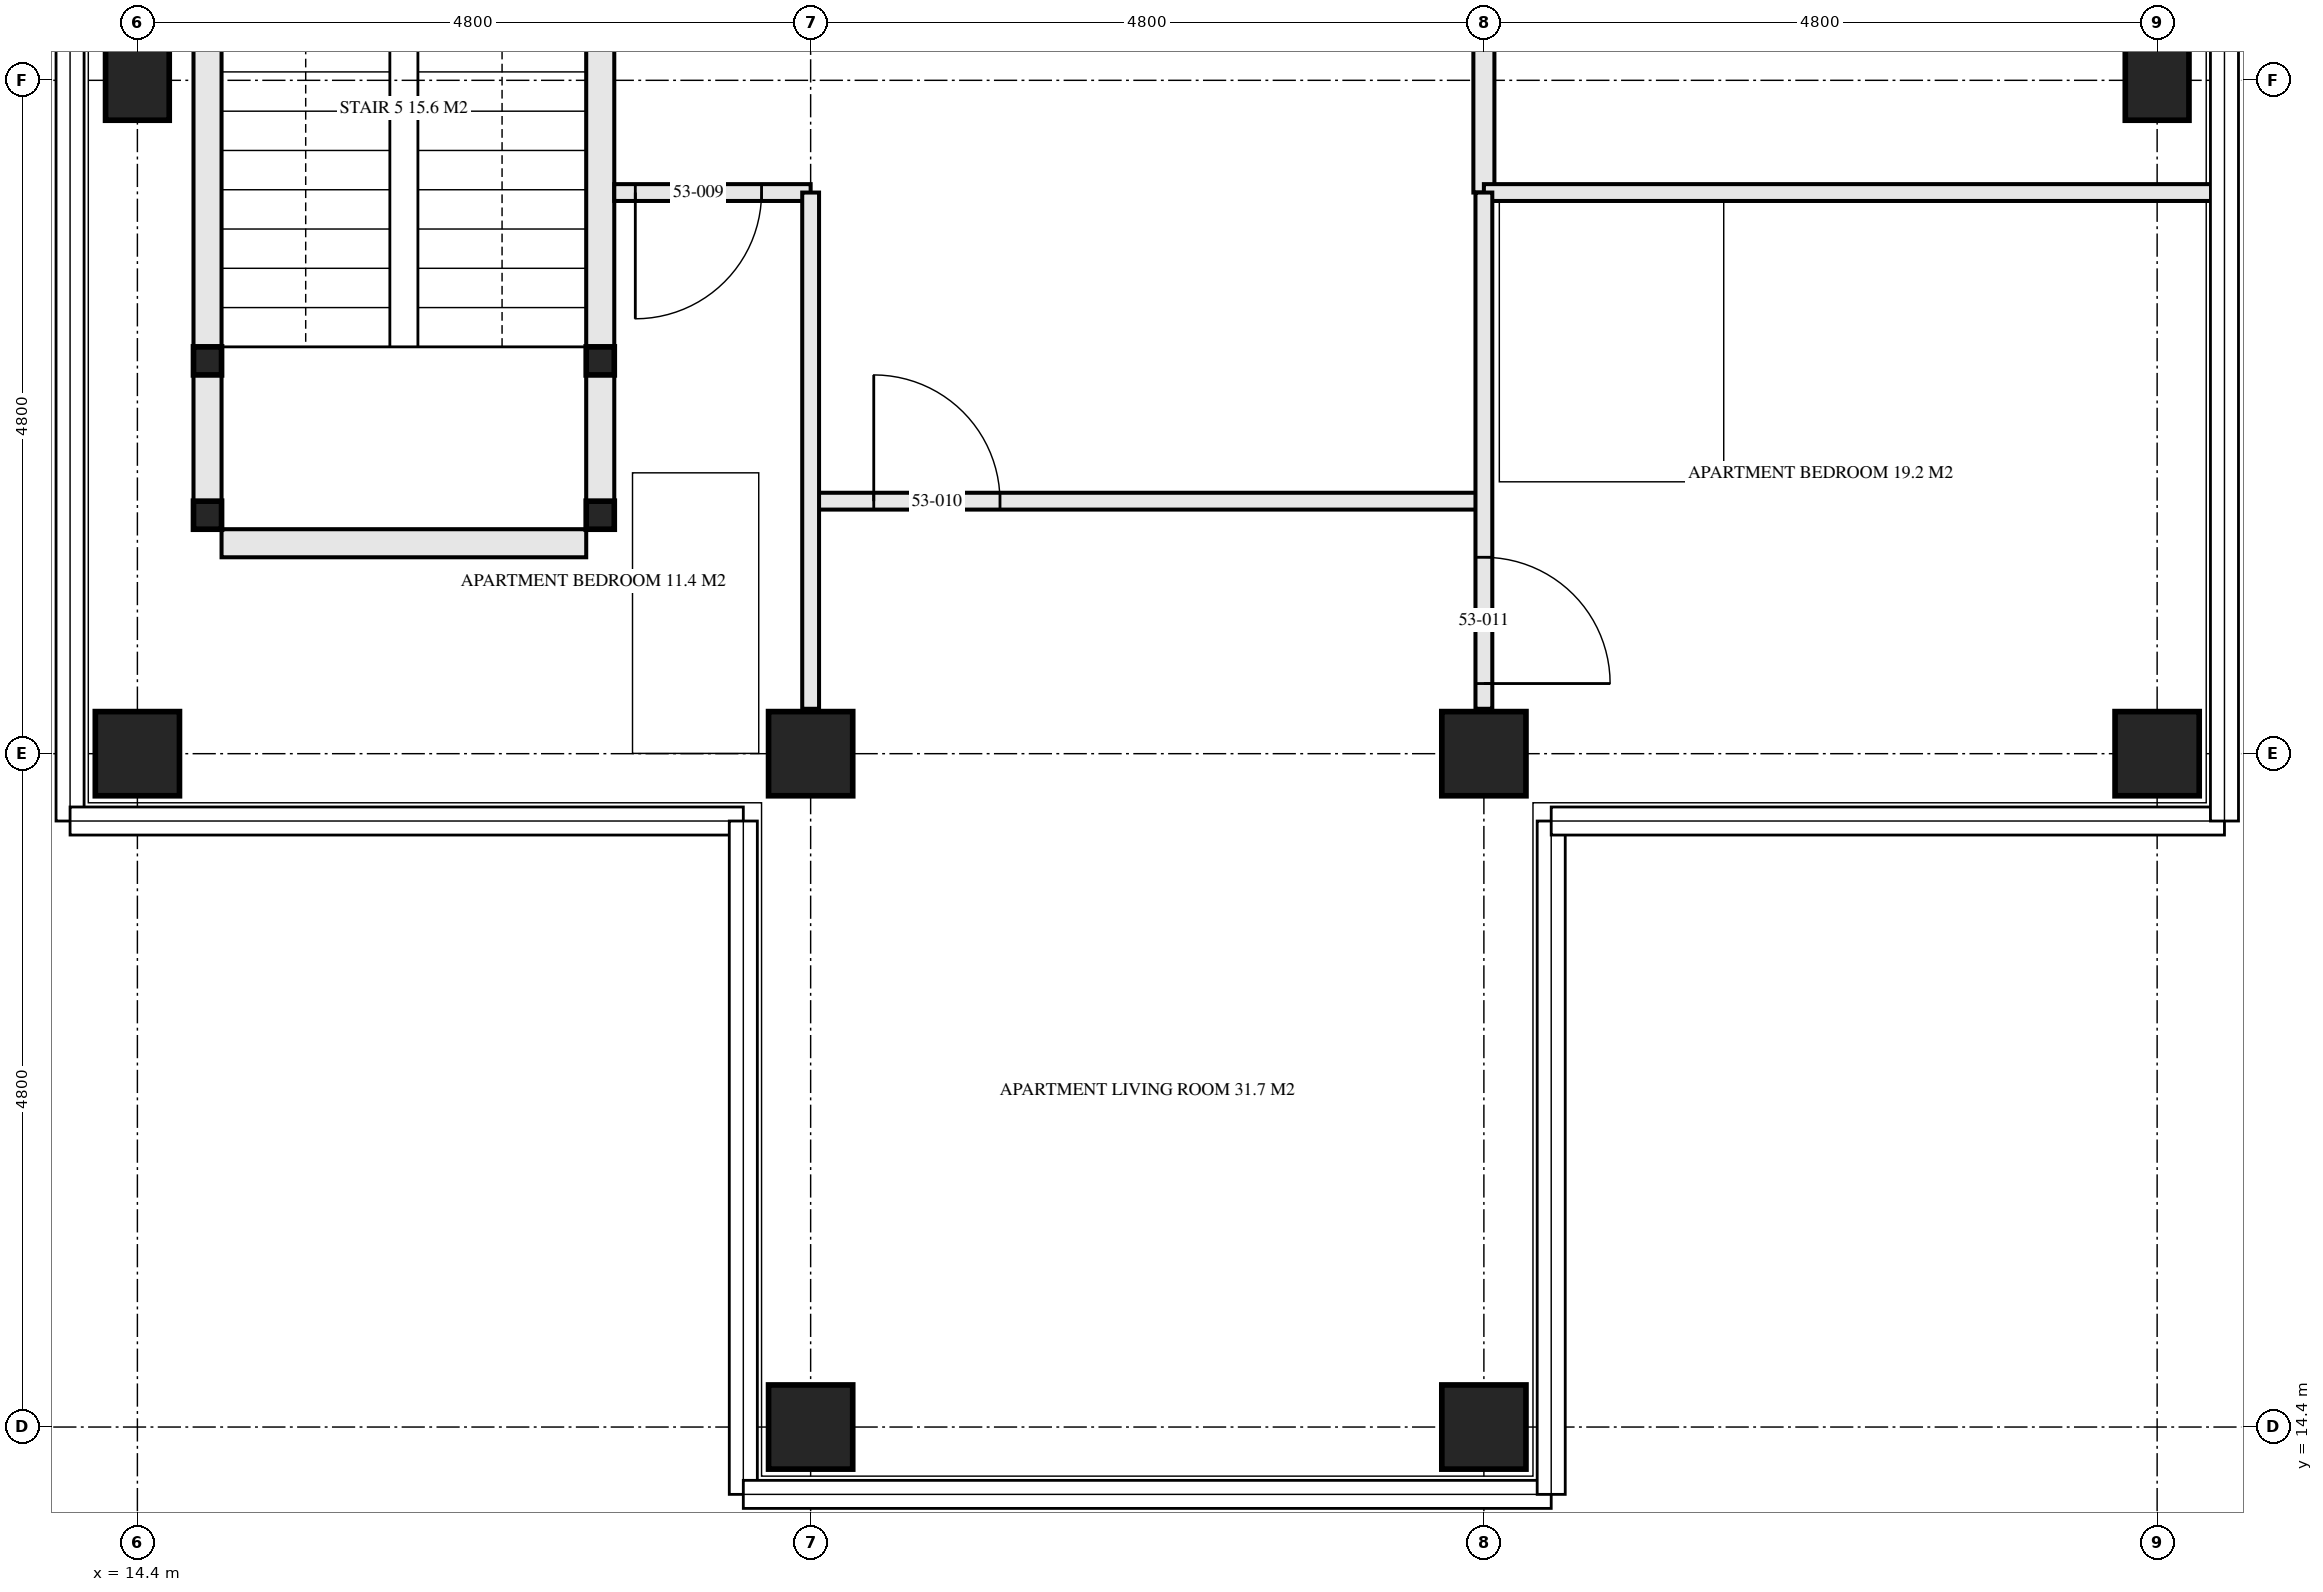
"""IFC4 building model, lengths in metres.
Left out: names, types, materials, properties, quantities, classifications, styles, units other than length and angle.
Written with IfcOpenShell. Run it as: python <this file> out.ifc"""

import sys

from ifc_helpers import new_model, si_unit, direction, frame, frame_2d, origin, origin_2d, place, context, subcontext, project, spatial, rectangle, hollow_rectangle, i_section, extrude, element, fill, save


model = new_model("IFC4")
c1 = context("Model", 3, precision=1e-05, world=origin(), true_north=direction((0.0, 1.0)))
c2 = subcontext(c1, "Body", "Model", "MODEL_VIEW")
j1 = project(units=[si_unit("LENGTHUNIT", "METRE"), si_unit("PLANEANGLEUNIT", "RADIAN")], contexts=[c1])
p1 = place(None, origin())
s1 = spatial("IfcSite", under=j1, at=p1, CompositionType="ELEMENT")
p2 = place(p1, origin())
s2 = spatial("IfcBuilding", under=s1, at=p2, CompositionType="ELEMENT")
p3 = place(p2, frame((0.0, 0.0, 194.5)))
s3 = spatial("IfcBuildingStorey", under=s2, at=p3, CompositionType="ELEMENT", Elevation=194.5)
p4 = place(p3, frame((14.4, 19.2, 0.0), z_axis=(0.0, 0.0, 1.0), x_axis=(0.0, 1.0, 0.0)))
e1 = element("IfcColumn", 1, at=p4, inside=s3, PredefinedType="COLUMN", context=c2, shape_type="SweptSolid", body=[
    extrude(hollow_rectangle(XDim=0.6, YDim=0.6, WallThickness=0.05, at=origin_2d()), origin(), (0.0, 0.0, 1.0), 3.5),
])
p5 = place(p3, frame((14.4, 24.0, 0.0), z_axis=(0.0, 0.0, 1.0), x_axis=(1.0, 0.0, 0.0)))
e2 = element("IfcColumn", 2, at=p5, inside=s3, PredefinedType="COLUMN", context=c2, shape_type="SweptSolid", body=[
    extrude(i_section(OverallWidth=0.454, OverallDepth=0.569, WebThickness=0.078, FlangeThickness=0.125, FilletRadius=0.015, at=origin_2d()), origin(), (0.0, 0.0, 1.0), 3.5),
])
for number, where, z_axis, x_axis in (
    (3, (19.2, 14.4, 0.0), (0.0, 0.0, 1.0), (0.0, 1.0, 0.0)),
    (4, (19.2, 19.2, 0.0), (0.0, 0.0, 1.0), (0.0, 1.0, 0.0)),
    (5, (24.0, 14.4, 0.0), (0.0, 0.0, 1.0), (0.0, 1.0, 0.0)),
    (6, (24.0, 19.2, 0.0), (0.0, 0.0, 1.0), (0.0, 1.0, 0.0)),
    (7, (28.8, 19.2, 0.0), (0.0, 0.0, 1.0), (0.0, 1.0, 0.0)),
):
    element("IfcColumn", number, at=place(p3, frame(where, z_axis=z_axis, x_axis=x_axis)), inside=s3, PredefinedType="COLUMN", context=c2, shape_type="SweptSolid", body=[
        extrude(hollow_rectangle(XDim=0.6, YDim=0.6, WallThickness=0.05, at=origin_2d()), origin(), (0.0, 0.0, 1.0), 3.5),
    ])
p6 = place(p3, frame((28.8, 24.0, 0.0), z_axis=(0.0, 0.0, 1.0), x_axis=(1.0, 0.0, 0.0)))
e8 = element("IfcColumn", 8, at=p6, inside=s3, PredefinedType="COLUMN", context=c2, shape_type="SweptSolid", body=[
    extrude(i_section(OverallWidth=0.454, OverallDepth=0.569, WebThickness=0.078, FlangeThickness=0.125, FilletRadius=0.015, at=origin_2d()), origin(), (0.0, 0.0, 1.0), 3.5),
])
for number, where, z_axis, x_axis in (
    (9, (14.9, 20.9, 0.0), (0.0, 0.0, 1.0), (1.0, 0.0, 0.0)),
    (10, (17.7, 20.9, 0.0), (0.0, 0.0, 1.0), (1.0, 0.0, 0.0)),
    (11, (14.9, 22.0, 0.0), (0.0, 0.0, 1.0), (1.0, 0.0, 0.0)),
    (12, (17.7, 22.0, 0.0), (0.0, 0.0, 1.0), (1.0, 0.0, 0.0)),
):
    element("IfcColumn", number, at=place(p3, frame(where, z_axis=z_axis, x_axis=x_axis)), inside=s3, PredefinedType="COLUMN", context=c2, shape_type="SweptSolid", body=[
        extrude(hollow_rectangle(XDim=0.2, YDim=0.2, WallThickness=0.008, at=origin_2d()), origin(), (0.0, 0.0, 1.0), 3.33),
    ])
p7 = place(p3, frame((14.9, 21.0, 0.0), z_axis=(0.0, 0.0, 1.0), x_axis=(0.0, 1.0, 0.0)))
e13 = element("IfcWall", 13, at=p7, inside=s3, PredefinedType="SOLIDWALL", context=c2, shape_type="SweptSolid", body=[
    extrude(rectangle(XDim=0.9, YDim=0.2, at=frame_2d((0.45, 0.0))), origin(), (0.0, 0.0, 1.0), 2.99),
])
p8 = place(p3, frame((14.9, 22.1, 0.0), z_axis=(0.0, 0.0, 1.0), x_axis=(0.0, 1.0, 0.0)))
e14 = element("IfcWall", 14, at=p8, inside=s3, PredefinedType="SOLIDWALL", context=c2, shape_type="SweptSolid", body=[
    extrude(rectangle(XDim=4.7, YDim=0.2, at=frame_2d((2.35, 0.0))), origin(), (0.0, 0.0, 1.0), 2.99),
])
p9 = place(p3, frame((17.7, 21.0, 0.0), z_axis=(0.0, 0.0, 1.0), x_axis=(0.0, 1.0, 0.0)))
e15 = element("IfcWall", 15, at=p9, inside=s3, PredefinedType="SOLIDWALL", context=c2, shape_type="SweptSolid", body=[
    extrude(rectangle(XDim=0.9, YDim=0.2, at=frame_2d((0.45, 0.0))), origin(), (0.0, 0.0, 1.0), 2.99),
])
p10 = place(p3, frame((17.7, 22.1, 0.0), z_axis=(0.0, 0.0, 1.0), x_axis=(0.0, 1.0, 0.0)))
e16 = element("IfcWall", 16, at=p10, inside=s3, PredefinedType="SOLIDWALL", context=c2, shape_type="SweptSolid", body=[
    extrude(rectangle(XDim=4.7, YDim=0.2, at=frame_2d((2.35, 0.0))), origin(), (0.0, 0.0, 1.0), 2.99),
])
p11 = place(p3, frame((15.0, 20.7, 0.0), z_axis=(0.0, 0.0, 1.0), x_axis=(1.0, 0.0, 0.0)))
e17 = element("IfcWall", 17, at=p11, inside=s3, PredefinedType="SOLIDWALL", context=c2, shape_type="SweptSolid", body=[
    extrude(rectangle(XDim=2.6, YDim=0.2, at=frame_2d((1.3, 0.0))), origin(), (0.0, 0.0, 1.0), 3.33),
])
p12 = place(p3, frame((24.0, 23.2, 0.0), z_axis=(0.0, 0.0, 1.0), x_axis=(0.0, 1.0, 0.0)))
e18 = element("IfcWall", 18, at=p12, inside=s3, PredefinedType="PARTITIONING", context=c2, shape_type="SweptSolid", body=[
    extrude(rectangle(XDim=3.0, YDim=0.15, at=frame_2d((1.5, 0.0))), origin(), (0.0, 0.0, 1.0), 2.55),
])
p13 = place(p12, frame((1.05, 0.0, 0.0)))
e19 = element("IfcOpeningElement", 19, at=p13, cuts=e18, PredefinedType="OPENING", context=c2, shape_type="SweptSolid", body=[
    extrude(rectangle(XDim=0.9, YDim=2.1, at=frame_2d((0.45, 1.05))), frame((0.0, 0.085, 0.0), z_axis=(0.0, -1.0, 0.0), x_axis=(1.0, 0.0, 0.0)), (0.0, 0.0, 1.0), 0.171),
])
p14 = place(p3, frame((17.8, 23.2, 0.0), z_axis=(0.0, 0.0, 1.0), x_axis=(1.0, 0.0, 0.0)))
e20 = element("IfcWall", 20, at=p14, inside=s3, PredefinedType="PARTITIONING", context=c2, shape_type="SweptSolid", body=[
    extrude(rectangle(XDim=1.4, YDim=0.12, at=frame_2d((0.7, 0.0))), origin(), (0.0, 0.0, 1.0), 3.33),
])
p15 = place(p14, frame((0.15, 0.0, 0.0)))
e21 = element("IfcOpeningElement", 21, at=p15, cuts=e20, PredefinedType="OPENING", context=c2, shape_type="SweptSolid", body=[
    extrude(rectangle(XDim=0.9, YDim=2.1, at=frame_2d((0.45, 1.05))), frame((0.0, 0.071, 0.0), z_axis=(0.0, -1.0, 0.0), x_axis=(1.0, 0.0, 0.0)), (0.0, 0.0, 1.0), 0.141),
])
p16 = place(p3, frame((19.2, 21.0, 0.0), z_axis=(0.0, 0.0, 1.0), x_axis=(1.0, 0.0, 0.0)))
e22 = element("IfcWall", 22, at=p16, inside=s3, PredefinedType="PARTITIONING", context=c2, shape_type="SweptSolid", body=[
    extrude(rectangle(XDim=4.8, YDim=0.12, at=frame_2d((2.4, 0.0))), origin(), (0.0, 0.0, 1.0), 3.33),
])
p17 = place(p16, frame((0.45, 0.0, 0.0)))
e23 = element("IfcOpeningElement", 23, at=p17, cuts=e22, PredefinedType="OPENING", context=c2, shape_type="SweptSolid", body=[
    extrude(rectangle(XDim=0.9, YDim=2.1, at=frame_2d((0.45, 1.05))), frame((0.0, 0.071, 0.0), z_axis=(0.0, -1.0, 0.0), x_axis=(1.0, 0.0, 0.0)), (0.0, 0.0, 1.0), 0.141),
])
p18 = place(p3, frame((24.0, 23.2, 0.0), z_axis=(0.0, 0.0, 1.0), x_axis=(1.0, 0.0, 0.0)))
e24 = element("IfcWall", 24, at=p18, inside=s3, PredefinedType="PARTITIONING", context=c2, shape_type="SweptSolid", body=[
    extrude(rectangle(XDim=5.255, YDim=0.12, at=frame_2d((2.627, 0.0))), origin(), (0.0, 0.0, 1.0), 2.32),
])
p19 = place(p3, frame((19.2, 19.52, 0.0), z_axis=(0.0, 0.0, 1.0), x_axis=(0.0, 1.0, 0.0)))
e25 = element("IfcWall", 25, at=p19, inside=s3, PredefinedType="PARTITIONING", context=c2, shape_type="SweptSolid", body=[
    extrude(rectangle(XDim=3.68, YDim=0.12, at=frame_2d((1.84, 0.0))), origin(), (0.0, 0.0, 1.0), 2.55),
])
p20 = place(p3, frame((24.0, 19.52, 0.0), z_axis=(0.0, 0.0, 1.0), x_axis=(0.0, 1.0, 0.0)))
e26 = element("IfcWall", 26, at=p20, inside=s3, PredefinedType="PARTITIONING", context=c2, shape_type="SweptSolid", body=[
    extrude(rectangle(XDim=3.68, YDim=0.12, at=frame_2d((1.84, 0.0))), origin(), (0.0, 0.0, 1.0), 3.33),
])
p21 = place(p20, frame((0.18, 0.0, 0.0)))
e27 = element("IfcOpeningElement", 27, at=p21, cuts=e26, PredefinedType="OPENING", context=c2, shape_type="SweptSolid", body=[
    extrude(rectangle(XDim=0.9, YDim=2.1, at=frame_2d((0.45, 1.05))), frame((0.0, 0.071, 0.0), z_axis=(0.0, -1.0, 0.0), x_axis=(1.0, 0.0, 0.0)), (0.0, 0.0, 1.0), 0.141),
])
p22 = place(p15, frame((0.9, 0.0, 0.0), z_axis=(0.0, 0.0, 1.0), x_axis=(-1.0, 0.0, 0.0)))
e28 = element("IfcDoor", 28, at=p22, inside=s3, OperationType="SINGLE_SWING_LEFT", PredefinedType="DOOR", context=c2, shape_type="SweptSolid", body=[
    extrude(rectangle(XDim=0.9, YDim=2.1, at=frame_2d((0.45, 1.05))), frame((0.0, 0.022, 0.0), z_axis=(0.0, -1.0, 0.0), x_axis=(1.0, 0.0, 0.0)), (0.0, 0.0, 1.0), 0.044),
])
fill(e21, e28)
p23 = place(p17, origin())
e29 = element("IfcDoor", 29, at=p23, inside=s3, OperationType="SINGLE_SWING_RIGHT", PredefinedType="DOOR", context=c2, shape_type="SweptSolid", body=[
    extrude(rectangle(XDim=0.9, YDim=2.1, at=frame_2d((0.45, 1.05))), frame((0.0, 0.022, 0.0), z_axis=(0.0, -1.0, 0.0), x_axis=(1.0, 0.0, 0.0)), (0.0, 0.0, 1.0), 0.044),
])
fill(e23, e29)
p24 = place(p21, frame((0.9, 0.0, 0.0), z_axis=(0.0, 0.0, 1.0), x_axis=(-1.0, 0.0, 0.0)))
e30 = element("IfcDoor", 30, at=p24, inside=s3, OperationType="SINGLE_SWING_LEFT", PredefinedType="DOOR", context=c2, shape_type="SweptSolid", body=[
    extrude(rectangle(XDim=0.9, YDim=2.1, at=frame_2d((0.45, 1.05))), frame((0.0, 0.022, 0.0), z_axis=(0.0, -1.0, 0.0), x_axis=(1.0, 0.0, 0.0)), (0.0, 0.0, 1.0), 0.044),
])
fill(e27, e30)
save(model, sys.argv[1])
